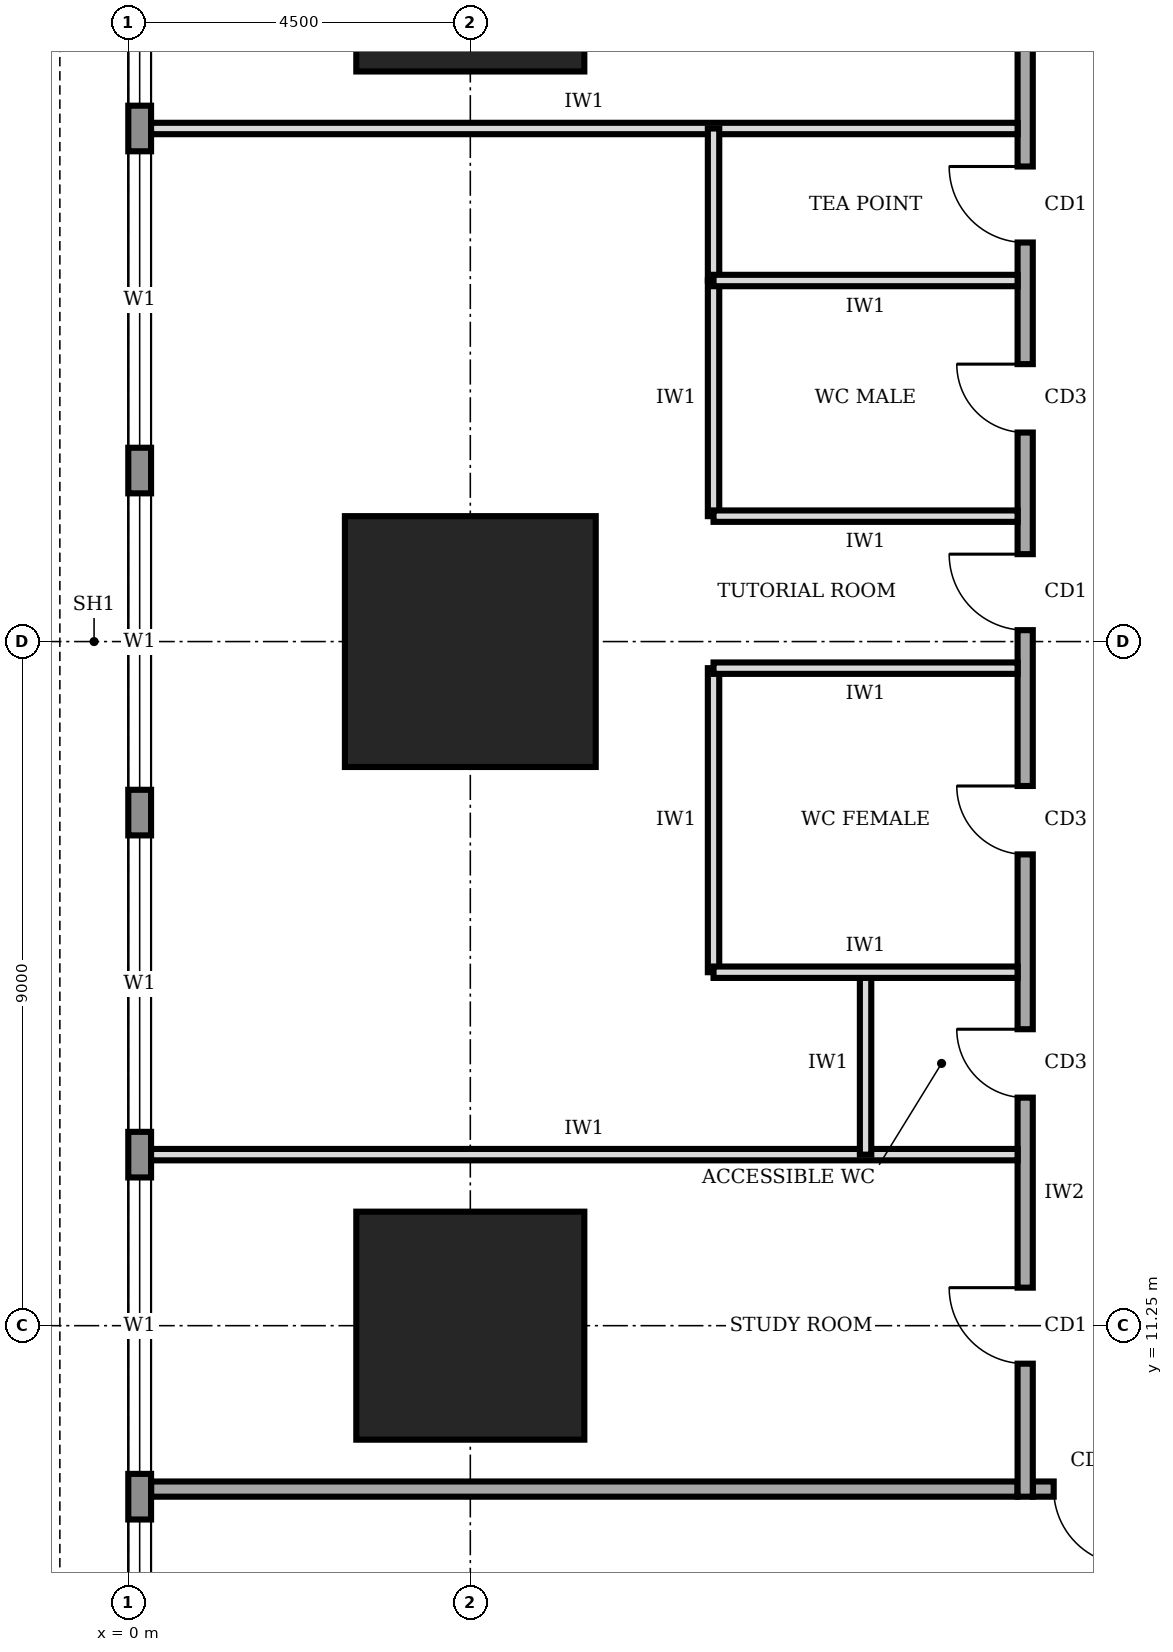
"""IFC4 building model, lengths in metres.
Left out: names, types, materials, properties, quantities, classifications, styles, units other than length and angle.
Written with IfcOpenShell. Run it as: python <this file> out.ifc"""

import sys

from ifc_helpers import new_model, si_unit, direction, frame, frame_2d, origin, origin_2d, place, context, subcontext, project, spatial, rectangle, extrude, element, fill, save


model = new_model("IFC4")
c1 = context("Model", 3, precision=1e-05, world=origin(), true_north=direction((0.0, 1.0)))
c2 = subcontext(c1, "Body", "Model", "MODEL_VIEW")
j1 = project(units=[si_unit("LENGTHUNIT", "METRE"), si_unit("PLANEANGLEUNIT", "RADIAN")], contexts=[c1])
p1 = place(None, origin())
s1 = spatial("IfcSite", under=j1, at=p1, CompositionType="ELEMENT")
p2 = place(p1, origin())
s2 = spatial("IfcBuilding", under=s1, at=p2, CompositionType="ELEMENT")
p3 = place(p2, frame((0.0, 0.0, 45.0)))
s3 = spatial("IfcBuildingStorey", under=s2, at=p3, CompositionType="ELEMENT", Elevation=45.0)
p4 = place(p3, frame((4.5, 11.25, 0.0), z_axis=(0.0, 0.0, 1.0), x_axis=(1.0, 0.0, 0.0)))
e1 = element("IfcColumn", 1, at=p4, inside=s3, PredefinedType="COLUMN", context=c2, shape_type="SweptSolid", body=[
    extrude(rectangle(XDim=3.0, YDim=3.0, at=origin_2d()), origin(), (0.0, 0.0, 1.0), 4.0),
])
p5 = place(p3, frame((4.5, 20.25, 0.0), z_axis=(0.0, 0.0, 1.0), x_axis=(1.0, 0.0, 0.0)))
e2 = element("IfcColumn", 2, at=p5, inside=s3, PredefinedType="COLUMN", context=c2, shape_type="SweptSolid", body=[
    extrude(rectangle(XDim=3.3, YDim=3.3, at=origin_2d()), origin(), (0.0, 0.0, 1.0), 4.0),
])
p6 = place(p3, frame((4.5, 29.25, 0.0), z_axis=(0.0, 0.0, 1.0), x_axis=(1.0, 0.0, 0.0)))
e3 = element("IfcColumn", 3, at=p6, inside=s3, PredefinedType="COLUMN", context=c2, shape_type="SweptSolid", body=[
    extrude(rectangle(XDim=3.0, YDim=3.0, at=origin_2d()), origin(), (0.0, 0.0, 1.0), 4.0),
])
p7 = place(p3, frame((0.15, 35.98, 0.0), z_axis=(0.0, 0.0, 1.0), x_axis=(0.0, -1.0, 0.0)))
e4 = element("IfcWall", 4, at=p7, inside=s3, PredefinedType="STANDARD", context=c2, shape_type="SweptSolid", body=[
    extrude(rectangle(XDim=31.46, YDim=0.3, at=frame_2d((15.73, 0.0))), origin(), (0.0, 0.0, 1.0), 3.75),
])
p8 = place(p7, frame((27.28, 0.0, 0.9)))
e5 = element("IfcOpeningElement", 5, at=p8, cuts=e4, PredefinedType="OPENING", context=c2, shape_type="SweptSolid", body=[
    extrude(rectangle(XDim=3.9, YDim=2.2, at=frame_2d((1.95, 1.1))), frame((0.0, 0.16, 0.0), z_axis=(0.0, -1.0, 0.0), x_axis=(1.0, 0.0, 0.0)), (0.0, 0.0, 1.0), 0.32),
])
p9 = place(p7, frame((22.78, 0.0, 0.9)))
e6 = element("IfcOpeningElement", 6, at=p9, cuts=e4, PredefinedType="OPENING", context=c2, shape_type="SweptSolid", body=[
    extrude(rectangle(XDim=3.9, YDim=2.2, at=frame_2d((1.95, 1.1))), frame((0.0, 0.16, 0.0), z_axis=(0.0, -1.0, 0.0), x_axis=(1.0, 0.0, 0.0)), (0.0, 0.0, 1.0), 0.32),
])
p10 = place(p7, frame((18.28, 0.0, 0.9)))
e7 = element("IfcOpeningElement", 7, at=p10, cuts=e4, PredefinedType="OPENING", context=c2, shape_type="SweptSolid", body=[
    extrude(rectangle(XDim=3.9, YDim=2.2, at=frame_2d((1.95, 1.1))), frame((0.0, 0.16, 0.0), z_axis=(0.0, -1.0, 0.0), x_axis=(1.0, 0.0, 0.0)), (0.0, 0.0, 1.0), 0.32),
])
p11 = place(p7, frame((13.78, 0.0, 0.9)))
e8 = element("IfcOpeningElement", 8, at=p11, cuts=e4, PredefinedType="OPENING", context=c2, shape_type="SweptSolid", body=[
    extrude(rectangle(XDim=3.9, YDim=2.2, at=frame_2d((1.95, 1.1))), frame((0.0, 0.16, 0.0), z_axis=(0.0, -1.0, 0.0), x_axis=(1.0, 0.0, 0.0)), (0.0, 0.0, 1.0), 0.32),
])
p12 = place(p7, frame((9.28, 0.0, 0.9)))
e9 = element("IfcOpeningElement", 9, at=p12, cuts=e4, PredefinedType="OPENING", context=c2, shape_type="SweptSolid", body=[
    extrude(rectangle(XDim=3.9, YDim=2.2, at=frame_2d((1.95, 1.1))), frame((0.0, 0.16, 0.0), z_axis=(0.0, -1.0, 0.0), x_axis=(1.0, 0.0, 0.0)), (0.0, 0.0, 1.0), 0.32),
])
p13 = place(p7, frame((4.78, 0.0, 0.9)))
e10 = element("IfcOpeningElement", 10, at=p13, cuts=e4, PredefinedType="OPENING", context=c2, shape_type="SweptSolid", body=[
    extrude(rectangle(XDim=3.9, YDim=2.2, at=frame_2d((1.95, 1.1))), frame((0.0, 0.16, 0.0), z_axis=(0.0, -1.0, 0.0), x_axis=(1.0, 0.0, 0.0)), (0.0, 0.0, 1.0), 0.32),
])
p14 = place(p3, frame((11.9, 9.1, 0.0), z_axis=(0.0, 0.0, 1.0), x_axis=(1.0, 0.0, 0.0)))
e11 = element("IfcWall", 11, at=p14, inside=s3, PredefinedType="SOLIDWALL", context=c2, shape_type="SweptSolid", body=[
    extrude(rectangle(XDim=18.4, YDim=0.2, at=frame_2d((9.2, 0.0))), origin(), (0.0, 0.0, 1.0), 3.75),
])
p15 = place(p14, frame((0.275, 0.0, 0.0)))
e12 = element("IfcOpeningElement", 12, at=p15, cuts=e11, PredefinedType="OPENING", context=c2, shape_type="SweptSolid", body=[
    extrude(rectangle(XDim=1.0, YDim=2.1, at=frame_2d((0.5, 1.05))), frame((0.0, 0.11, 0.0), z_axis=(0.0, -1.0, 0.0), x_axis=(1.0, 0.0, 0.0)), (0.0, 0.0, 1.0), 0.22),
])
p16 = place(p14, frame((3.35, 0.0, 0.0)))
e13 = element("IfcOpeningElement", 13, at=p16, cuts=e11, PredefinedType="OPENING", context=c2, shape_type="SweptSolid", body=[
    extrude(rectangle(XDim=1.0, YDim=2.1, at=frame_2d((0.5, 1.05))), frame((0.0, 0.11, 0.0), z_axis=(0.0, -1.0, 0.0), x_axis=(1.0, 0.0, 0.0)), (0.0, 0.0, 1.0), 0.22),
])
p17 = place(p14, frame((10.1, 0.0, 0.0)))
e14 = element("IfcOpeningElement", 14, at=p17, cuts=e11, PredefinedType="OPENING", context=c2, shape_type="SweptSolid", body=[
    extrude(rectangle(XDim=1.0, YDim=2.1, at=frame_2d((0.5, 1.05))), frame((0.0, 0.11, 0.0), z_axis=(0.0, -1.0, 0.0), x_axis=(1.0, 0.0, 0.0)), (0.0, 0.0, 1.0), 0.22),
])
p18 = place(p14, frame((15.85, 0.0, 0.0)))
e15 = element("IfcOpeningElement", 15, at=p18, cuts=e11, PredefinedType="OPENING", context=c2, shape_type="SweptSolid", body=[
    extrude(rectangle(XDim=1.8, YDim=2.1, at=frame_2d((0.9, 1.05))), frame((0.0, 0.11, 0.0), z_axis=(0.0, -1.0, 0.0), x_axis=(1.0, 0.0, 0.0)), (0.0, 0.0, 1.0), 0.22),
])
p19 = place(p3, frame((11.8, 31.3, 0.0), z_axis=(0.0, 0.0, 1.0), x_axis=(0.0, -1.0, 0.0)))
e16 = element("IfcWall", 16, at=p19, inside=s3, PredefinedType="SOLIDWALL", context=c2, shape_type="SweptSolid", body=[
    extrude(rectangle(XDim=22.3, YDim=0.2, at=frame_2d((11.15, 0.0))), origin(), (0.0, 0.0, 1.0), 3.75),
])
p20 = place(p19, frame((19.55, 0.0, 0.0)))
e17 = element("IfcOpeningElement", 17, at=p20, cuts=e16, PredefinedType="OPENING", context=c2, shape_type="SweptSolid", body=[
    extrude(rectangle(XDim=1.0, YDim=2.1, at=frame_2d((0.5, 1.05))), frame((0.0, 0.11, 0.0), z_axis=(0.0, -1.0, 0.0), x_axis=(1.0, 0.0, 0.0)), (0.0, 0.0, 1.0), 0.22),
])
p21 = place(p19, frame((16.15, 0.0, 0.0)))
e18 = element("IfcOpeningElement", 18, at=p21, cuts=e16, PredefinedType="OPENING", context=c2, shape_type="SweptSolid", body=[
    extrude(rectangle(XDim=0.9, YDim=2.1, at=frame_2d((0.45, 1.05))), frame((0.0, 0.11, 0.0), z_axis=(0.0, -1.0, 0.0), x_axis=(1.0, 0.0, 0.0)), (0.0, 0.0, 1.0), 0.22),
])
p22 = place(p19, frame((12.95, 0.0, 0.0)))
e19 = element("IfcOpeningElement", 19, at=p22, cuts=e16, PredefinedType="OPENING", context=c2, shape_type="SweptSolid", body=[
    extrude(rectangle(XDim=0.9, YDim=2.1, at=frame_2d((0.45, 1.05))), frame((0.0, 0.11, 0.0), z_axis=(0.0, -1.0, 0.0), x_axis=(1.0, 0.0, 0.0)), (0.0, 0.0, 1.0), 0.22),
])
p23 = place(p19, frame((7.4, 0.0, 0.0)))
e20 = element("IfcOpeningElement", 20, at=p23, cuts=e16, PredefinedType="OPENING", context=c2, shape_type="SweptSolid", body=[
    extrude(rectangle(XDim=0.9, YDim=2.1, at=frame_2d((0.45, 1.05))), frame((0.0, 0.11, 0.0), z_axis=(0.0, -1.0, 0.0), x_axis=(1.0, 0.0, 0.0)), (0.0, 0.0, 1.0), 0.22),
])
p24 = place(p19, frame((4.8, 0.0, 0.0)))
e21 = element("IfcOpeningElement", 21, at=p24, cuts=e16, PredefinedType="OPENING", context=c2, shape_type="SweptSolid", body=[
    extrude(rectangle(XDim=1.0, YDim=2.1, at=frame_2d((0.5, 1.05))), frame((0.0, 0.11, 0.0), z_axis=(0.0, -1.0, 0.0), x_axis=(1.0, 0.0, 0.0)), (0.0, 0.0, 1.0), 0.22),
])
p25 = place(p19, frame((9.9, 0.0, 0.0)))
e22 = element("IfcOpeningElement", 22, at=p25, cuts=e16, PredefinedType="OPENING", context=c2, shape_type="SweptSolid", body=[
    extrude(rectangle(XDim=1.0, YDim=2.1, at=frame_2d((0.5, 1.05))), frame((0.0, 0.11, 0.0), z_axis=(0.0, -1.0, 0.0), x_axis=(1.0, 0.0, 0.0)), (0.0, 0.0, 1.0), 0.22),
])
p26 = place(p19, frame((1.55, 0.0, 0.0)))
e23 = element("IfcOpeningElement", 23, at=p26, cuts=e16, PredefinedType="OPENING", context=c2, shape_type="SweptSolid", body=[
    extrude(rectangle(XDim=1.0, YDim=2.1, at=frame_2d((0.5, 1.05))), frame((0.0, 0.11, 0.0), z_axis=(0.0, -1.0, 0.0), x_axis=(1.0, 0.0, 0.0)), (0.0, 0.0, 1.0), 0.22),
])
p27 = place(p3, frame((0.3, 9.1, 0.0), z_axis=(0.0, 0.0, 1.0), x_axis=(1.0, 0.0, 0.0)))
e24 = element("IfcWall", 24, at=p27, inside=s3, PredefinedType="SOLIDWALL", context=c2, shape_type="SweptSolid", body=[
    extrude(rectangle(XDim=11.4, YDim=0.2, at=frame_2d((5.7, 0.0))), origin(), (0.0, 0.0, 1.0), 3.75),
])
for number, where, z_axis, x_axis in (
    (25, (0.3, 13.5, 0.0), (0.0, 0.0, 1.0), (1.0, 0.0, 0.0)),
    (26, (0.3, 27.0, 0.0), (0.0, 0.0, 1.0), (1.0, 0.0, 0.0)),
):
    element("IfcWall", number, at=place(p3, frame(where, z_axis=z_axis, x_axis=x_axis)), inside=s3, PredefinedType="PARTITIONING", context=c2, shape_type="SweptSolid", body=[
        extrude(rectangle(XDim=11.4, YDim=0.15, at=frame_2d((5.7, 0.0))), origin(), (0.0, 0.0, 1.0), 3.75),
    ])
p28 = place(p3, frame((11.7, 15.9, 0.0), z_axis=(0.0, 0.0, 1.0), x_axis=(-1.0, 0.0, 0.0)))
e27 = element("IfcWall", 27, at=p28, inside=s3, PredefinedType="PARTITIONING", context=c2, shape_type="SweptSolid", body=[
    extrude(rectangle(XDim=4.0, YDim=0.15, at=frame_2d((2.0, 0.0))), origin(), (0.0, 0.0, 1.0), 3.75),
])
p29 = place(p3, frame((11.7, 19.9, 0.0), z_axis=(0.0, 0.0, 1.0), x_axis=(-1.0, 0.0, 0.0)))
e28 = element("IfcWall", 28, at=p29, inside=s3, PredefinedType="PARTITIONING", context=c2, shape_type="SweptSolid", body=[
    extrude(rectangle(XDim=4.0, YDim=0.15, at=frame_2d((2.0, 0.0))), origin(), (0.0, 0.0, 1.0), 2.85),
])
for number, where, z_axis, x_axis in (
    (29, (11.7, 21.9, 0.0), (0.0, 0.0, 1.0), (-1.0, 0.0, 0.0)),
    (30, (11.7, 25.0, 0.0), (0.0, 0.0, 1.0), (-1.0, 0.0, 0.0)),
):
    element("IfcWall", number, at=place(p3, frame(where, z_axis=z_axis, x_axis=x_axis)), inside=s3, PredefinedType="PARTITIONING", context=c2, shape_type="SweptSolid", body=[
        extrude(rectangle(XDim=4.0, YDim=0.15, at=frame_2d((2.0, 0.0))), origin(), (0.0, 0.0, 1.0), 3.75),
    ])
p30 = place(p3, frame((9.7, 13.5, 0.0), z_axis=(0.0, 0.0, 1.0), x_axis=(0.0, 1.0, 0.0)))
e31 = element("IfcWall", 31, at=p30, inside=s3, PredefinedType="PARTITIONING", context=c2, shape_type="SweptSolid", body=[
    extrude(rectangle(XDim=2.4, YDim=0.15, at=frame_2d((1.2, 0.0))), origin(), (0.0, 0.0, 1.0), 3.75),
])
p31 = place(p3, frame((7.7, 15.9, 0.0), z_axis=(0.0, 0.0, 1.0), x_axis=(0.0, 1.0, 0.0)))
e32 = element("IfcWall", 32, at=p31, inside=s3, PredefinedType="PARTITIONING", context=c2, shape_type="SweptSolid", body=[
    extrude(rectangle(XDim=4.0, YDim=0.15, at=frame_2d((2.0, 0.0))), origin(), (0.0, 0.0, 1.0), 3.75),
])
p32 = place(p3, frame((7.7, 21.9, 0.0), z_axis=(0.0, 0.0, 1.0), x_axis=(0.0, 1.0, 0.0)))
e33 = element("IfcWall", 33, at=p32, inside=s3, PredefinedType="PARTITIONING", context=c2, shape_type="SweptSolid", body=[
    extrude(rectangle(XDim=3.1, YDim=0.15, at=frame_2d((1.55, 0.0))), origin(), (0.0, 0.0, 1.0), 3.75),
])
p33 = place(p3, frame((7.7, 25.0, 0.0), z_axis=(0.0, 0.0, 1.0), x_axis=(0.0, 1.0, 0.0)))
e34 = element("IfcWall", 34, at=p33, inside=s3, PredefinedType="PARTITIONING", context=c2, shape_type="SweptSolid", body=[
    extrude(rectangle(XDim=2.0, YDim=0.15, at=frame_2d((1.0, 0.0))), origin(), (0.0, 0.0, 1.0), 3.75),
])
p34 = place(p8, origin())
e35 = element("IfcWindow", 35, at=p34, inside=s3, PartitioningType="SINGLE_PANEL", PredefinedType="WINDOW", context=c2, shape_type="SweptSolid", body=[
    extrude(rectangle(XDim=3.9, YDim=2.2, at=frame_2d((1.95, 1.1))), frame((0.0, 0.03, 0.0), z_axis=(0.0, -1.0, 0.0), x_axis=(1.0, 0.0, 0.0)), (0.0, 0.0, 1.0), 0.06),
])
fill(e5, e35)
p35 = place(p9, origin())
e36 = element("IfcWindow", 36, at=p35, inside=s3, PartitioningType="SINGLE_PANEL", PredefinedType="WINDOW", context=c2, shape_type="SweptSolid", body=[
    extrude(rectangle(XDim=3.9, YDim=2.2, at=frame_2d((1.95, 1.1))), frame((0.0, 0.03, 0.0), z_axis=(0.0, -1.0, 0.0), x_axis=(1.0, 0.0, 0.0)), (0.0, 0.0, 1.0), 0.06),
])
fill(e6, e36)
p36 = place(p10, origin())
e37 = element("IfcWindow", 37, at=p36, inside=s3, PartitioningType="SINGLE_PANEL", PredefinedType="WINDOW", context=c2, shape_type="SweptSolid", body=[
    extrude(rectangle(XDim=3.9, YDim=2.2, at=frame_2d((1.95, 1.1))), frame((0.0, 0.03, 0.0), z_axis=(0.0, -1.0, 0.0), x_axis=(1.0, 0.0, 0.0)), (0.0, 0.0, 1.0), 0.06),
])
fill(e7, e37)
p37 = place(p11, origin())
e38 = element("IfcWindow", 38, at=p37, inside=s3, PartitioningType="SINGLE_PANEL", PredefinedType="WINDOW", context=c2, shape_type="SweptSolid", body=[
    extrude(rectangle(XDim=3.9, YDim=2.2, at=frame_2d((1.95, 1.1))), frame((0.0, 0.03, 0.0), z_axis=(0.0, -1.0, 0.0), x_axis=(1.0, 0.0, 0.0)), (0.0, 0.0, 1.0), 0.06),
])
fill(e8, e38)
p38 = place(p12, origin())
e39 = element("IfcWindow", 39, at=p38, inside=s3, PartitioningType="SINGLE_PANEL", PredefinedType="WINDOW", context=c2, shape_type="SweptSolid", body=[
    extrude(rectangle(XDim=3.9, YDim=2.2, at=frame_2d((1.95, 1.1))), frame((0.0, 0.03, 0.0), z_axis=(0.0, -1.0, 0.0), x_axis=(1.0, 0.0, 0.0)), (0.0, 0.0, 1.0), 0.06),
])
fill(e9, e39)
p39 = place(p13, origin())
e40 = element("IfcWindow", 40, at=p39, inside=s3, PartitioningType="SINGLE_PANEL", PredefinedType="WINDOW", context=c2, shape_type="SweptSolid", body=[
    extrude(rectangle(XDim=3.9, YDim=2.2, at=frame_2d((1.95, 1.1))), frame((0.0, 0.03, 0.0), z_axis=(0.0, -1.0, 0.0), x_axis=(1.0, 0.0, 0.0)), (0.0, 0.0, 1.0), 0.06),
])
fill(e10, e40)
p40 = place(p15, frame((1.0, 0.0, 0.0), z_axis=(0.0, 0.0, 1.0), x_axis=(-1.0, 0.0, 0.0)))
e41 = element("IfcDoor", 41, at=p40, inside=s3, OperationType="SINGLE_SWING_LEFT", PredefinedType="DOOR", context=c2, shape_type="SweptSolid", body=[
    extrude(rectangle(XDim=1.0, YDim=2.1, at=frame_2d((0.5, 1.05))), frame((0.0, 0.025, 0.0), z_axis=(0.0, -1.0, 0.0), x_axis=(1.0, 0.0, 0.0)), (0.0, 0.0, 1.0), 0.05),
])
fill(e12, e41)
p41 = place(p20, frame((1.0, 0.0, 0.0), z_axis=(0.0, 0.0, 1.0), x_axis=(-1.0, 0.0, 0.0)))
e42 = element("IfcDoor", 42, at=p41, inside=s3, OperationType="SINGLE_SWING_RIGHT", PredefinedType="DOOR", context=c2, shape_type="SweptSolid", body=[
    extrude(rectangle(XDim=1.0, YDim=2.1, at=frame_2d((0.5, 1.05))), frame((0.0, 0.025, 0.0), z_axis=(0.0, -1.0, 0.0), x_axis=(1.0, 0.0, 0.0)), (0.0, 0.0, 1.0), 0.05),
])
fill(e17, e42)
p42 = place(p21, frame((0.9, 0.0, 0.0), z_axis=(0.0, 0.0, 1.0), x_axis=(-1.0, 0.0, 0.0)))
e43 = element("IfcDoor", 43, at=p42, inside=s3, OperationType="SINGLE_SWING_RIGHT", PredefinedType="DOOR", context=c2, shape_type="SweptSolid", body=[
    extrude(rectangle(XDim=0.9, YDim=2.1, at=frame_2d((0.45, 1.05))), frame((0.0, 0.025, 0.0), z_axis=(0.0, -1.0, 0.0), x_axis=(1.0, 0.0, 0.0)), (0.0, 0.0, 1.0), 0.05),
])
fill(e18, e43)
p43 = place(p22, frame((0.9, 0.0, 0.0), z_axis=(0.0, 0.0, 1.0), x_axis=(-1.0, 0.0, 0.0)))
e44 = element("IfcDoor", 44, at=p43, inside=s3, OperationType="SINGLE_SWING_RIGHT", PredefinedType="DOOR", context=c2, shape_type="SweptSolid", body=[
    extrude(rectangle(XDim=0.9, YDim=2.1, at=frame_2d((0.45, 1.05))), frame((0.0, 0.025, 0.0), z_axis=(0.0, -1.0, 0.0), x_axis=(1.0, 0.0, 0.0)), (0.0, 0.0, 1.0), 0.05),
])
fill(e19, e44)
p44 = place(p23, frame((0.9, 0.0, 0.0), z_axis=(0.0, 0.0, 1.0), x_axis=(-1.0, 0.0, 0.0)))
e45 = element("IfcDoor", 45, at=p44, inside=s3, OperationType="SINGLE_SWING_RIGHT", PredefinedType="DOOR", context=c2, shape_type="SweptSolid", body=[
    extrude(rectangle(XDim=0.9, YDim=2.1, at=frame_2d((0.45, 1.05))), frame((0.0, 0.025, 0.0), z_axis=(0.0, -1.0, 0.0), x_axis=(1.0, 0.0, 0.0)), (0.0, 0.0, 1.0), 0.05),
])
fill(e20, e45)
p45 = place(p24, frame((1.0, 0.0, 0.0), z_axis=(0.0, 0.0, 1.0), x_axis=(-1.0, 0.0, 0.0)))
e46 = element("IfcDoor", 46, at=p45, inside=s3, OperationType="SINGLE_SWING_RIGHT", PredefinedType="DOOR", context=c2, shape_type="SweptSolid", body=[
    extrude(rectangle(XDim=1.0, YDim=2.1, at=frame_2d((0.5, 1.05))), frame((0.0, 0.025, 0.0), z_axis=(0.0, -1.0, 0.0), x_axis=(1.0, 0.0, 0.0)), (0.0, 0.0, 1.0), 0.05),
])
fill(e21, e46)
p46 = place(p25, frame((1.0, 0.0, 0.0), z_axis=(0.0, 0.0, 1.0), x_axis=(-1.0, 0.0, 0.0)))
e47 = element("IfcDoor", 47, at=p46, inside=s3, OperationType="SINGLE_SWING_RIGHT", PredefinedType="DOOR", context=c2, shape_type="SweptSolid", body=[
    extrude(rectangle(XDim=1.0, YDim=2.1, at=frame_2d((0.5, 1.05))), frame((0.0, 0.025, 0.0), z_axis=(0.0, -1.0, 0.0), x_axis=(1.0, 0.0, 0.0)), (0.0, 0.0, 1.0), 0.05),
])
fill(e22, e47)
save(model, sys.argv[1])
